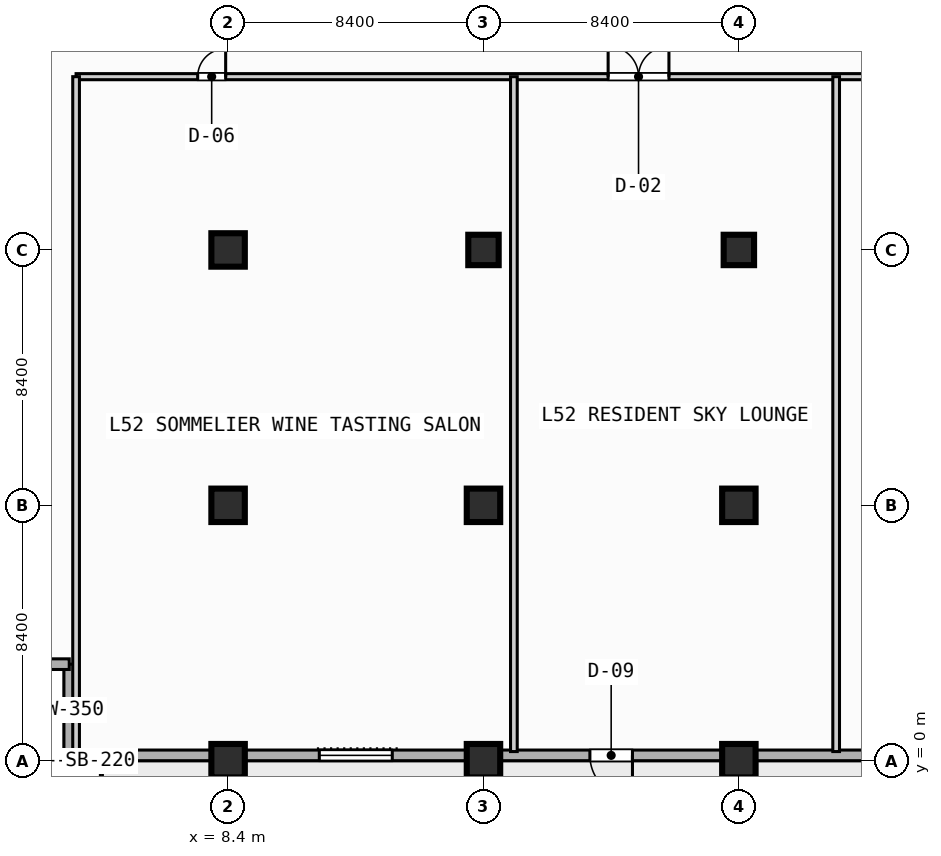
"""IFC4 building model, lengths in metres.
Left out: names, types, materials, properties, quantities, classifications, styles, units other than length and angle.
Written with IfcOpenShell. Run it as: python <this file> out.ifc"""

import sys

from ifc_helpers import new_model, si_unit, direction, frame, frame_2d, origin, origin_2d, place, context, subcontext, project, spatial, rectangle, extrude, element, fill, save


model = new_model("IFC4")
c1 = context("Model", 3, precision=1e-05, world=origin(), true_north=direction((0.0, 1.0)))
c2 = subcontext(c1, "Body", "Model", "MODEL_VIEW")
j1 = project(units=[si_unit("LENGTHUNIT", "METRE"), si_unit("PLANEANGLEUNIT", "RADIAN")], contexts=[c1])
p1 = place(None, origin())
s1 = spatial("IfcSite", under=j1, at=p1, CompositionType="ELEMENT")
p2 = place(p1, origin())
s2 = spatial("IfcBuilding", under=s1, at=p2, CompositionType="ELEMENT")
p3 = place(p2, frame((0.0, 0.0, 212.4)))
s3 = spatial("IfcBuildingStorey", under=s2, at=p3, CompositionType="ELEMENT", Elevation=212.4)
for number, where, z_axis, x_axis in (
    (1, (8.4, 0.0, 0.0), (0.0, 0.0, 1.0), (1.0, 0.0, 0.0)),
    (2, (8.4, 8.4, 0.0), (0.0, 0.0, 1.0), (1.0, 0.0, 0.0)),
    (3, (8.4, 16.8, 0.0), (0.0, 0.0, 1.0), (1.0, 0.0, 0.0)),
    (4, (16.8, 0.0, 0.0), (0.0, 0.0, 1.0), (1.0, 0.0, 0.0)),
    (5, (16.8, 8.4, 0.0), (0.0, 0.0, 1.0), (1.0, 0.0, 0.0)),
):
    element("IfcColumn", number, at=place(p3, frame(where, z_axis=z_axis, x_axis=x_axis)), inside=s3, PredefinedType="COLUMN", context=c2, shape_type="SweptSolid", body=[
        extrude(rectangle(XDim=1.1, YDim=1.1, at=origin_2d()), origin(), (0.0, 0.0, 1.0), 3.7),
    ])
p4 = place(p3, frame((16.8, 16.8, 0.0), z_axis=(0.0, 0.0, 1.0), x_axis=(1.0, 0.0, 0.0)))
e6 = element("IfcColumn", 6, at=p4, inside=s3, PredefinedType="COLUMN", context=c2, shape_type="SweptSolid", body=[
    extrude(rectangle(XDim=1.0, YDim=1.0, at=origin_2d()), origin(), (0.0, 0.0, 1.0), 3.7),
])
for number, where, z_axis, x_axis in (
    (7, (25.2, 0.0, 0.0), (0.0, 0.0, 1.0), (1.0, 0.0, 0.0)),
    (8, (25.2, 8.4, 0.0), (0.0, 0.0, 1.0), (1.0, 0.0, 0.0)),
):
    element("IfcColumn", number, at=place(p3, frame(where, z_axis=z_axis, x_axis=x_axis)), inside=s3, PredefinedType="COLUMN", context=c2, shape_type="SweptSolid", body=[
        extrude(rectangle(XDim=1.1, YDim=1.1, at=origin_2d()), origin(), (0.0, 0.0, 1.0), 3.7),
    ])
p5 = place(p3, frame((25.2, 16.8, 0.0), z_axis=(0.0, 0.0, 1.0), x_axis=(1.0, 0.0, 0.0)))
e9 = element("IfcColumn", 9, at=p5, inside=s3, PredefinedType="COLUMN", context=c2, shape_type="SweptSolid", body=[
    extrude(rectangle(XDim=1.0, YDim=1.0, at=origin_2d()), origin(), (0.0, 0.0, 1.0), 3.7),
])
for number, where, z_axis, x_axis in (
    (10, (3.175, 0.175, 0.0), (0.0, 0.0, 1.0), (0.0, 1.0, 0.0)),
    (11, (3.175, 3.175, 0.0), (0.0, 0.0, 1.0), (-1.0, 0.0, 0.0)),
):
    element("IfcWall", number, at=place(p3, frame(where, z_axis=z_axis, x_axis=x_axis)), inside=s3, PredefinedType="STANDARD", context=c2, shape_type="SweptSolid", body=[
        extrude(rectangle(XDim=3.0, YDim=0.35, at=frame_2d((1.5, 0.0))), origin(), (0.0, 0.0, 1.0), 3.47),
    ])
p6 = place(p3, frame((72.425, 0.175, 0.0), z_axis=(0.0, 0.0, 1.0), x_axis=(-1.0, 0.0, 0.0)))
e12 = element("IfcWall", 12, at=p6, inside=s3, PredefinedType="STANDARD", context=c2, shape_type="SweptSolid", body=[
    extrude(rectangle(XDim=69.25, YDim=0.35, at=frame_2d((34.625, 0.0))), origin(), (0.0, 0.0, 1.0), 3.47),
])
p7 = place(p6, frame((50.725, 0.0, 0.0)))
e13 = element("IfcOpeningElement", 13, at=p7, cuts=e12, PredefinedType="OPENING", context=c2, shape_type="SweptSolid", body=[
    extrude(rectangle(XDim=1.4, YDim=2.2, at=frame_2d((0.7, 1.1))), frame((0.0, 0.185, 0.0), z_axis=(0.0, -1.0, 0.0), x_axis=(1.0, 0.0, 0.0)), (0.0, 0.0, 1.0), 0.37),
])
p8 = place(p6, frame((58.625, 0.0, 0.85)))
e14 = element("IfcOpeningElement", 14, at=p8, cuts=e12, PredefinedType="OPENING", context=c2, shape_type="SweptSolid", body=[
    extrude(rectangle(XDim=2.4, YDim=1.95, at=frame_2d((1.2, 0.975))), frame((0.0, 0.185, 0.0), z_axis=(0.0, -1.0, 0.0), x_axis=(1.0, 0.0, 0.0)), (0.0, 0.0, 1.0), 0.37),
])
p9 = place(p6, frame((33.725, 0.0, 0.85)))
e15 = element("IfcOpeningElement", 15, at=p9, cuts=e12, PredefinedType="OPENING", context=c2, shape_type="SweptSolid", body=[
    extrude(rectangle(XDim=1.8, YDim=1.8, at=frame_2d((0.9, 0.9))), frame((0.0, 0.185, 0.0), z_axis=(0.0, -1.0, 0.0), x_axis=(1.0, 0.0, 0.0)), (0.0, 0.0, 1.0), 0.37),
])
p10 = place(p6, frame((25.025, 0.0, 0.85)))
e16 = element("IfcOpeningElement", 16, at=p10, cuts=e12, PredefinedType="OPENING", context=c2, shape_type="SweptSolid", body=[
    extrude(rectangle(XDim=2.4, YDim=1.95, at=frame_2d((1.2, 0.975))), frame((0.0, 0.185, 0.0), z_axis=(0.0, -1.0, 0.0), x_axis=(1.0, 0.0, 0.0)), (0.0, 0.0, 1.0), 0.37),
])
p11 = place(p6, frame((9.075, 0.0, 0.85)))
e17 = element("IfcOpeningElement", 17, at=p11, cuts=e12, PredefinedType="OPENING", context=c2, shape_type="SweptSolid", body=[
    extrude(rectangle(XDim=1.8, YDim=1.8, at=frame_2d((0.9, 0.9))), frame((0.0, 0.185, 0.0), z_axis=(0.0, -1.0, 0.0), x_axis=(1.0, 0.0, 0.0)), (0.0, 0.0, 1.0), 0.37),
])
p12 = place(p6, frame((2.675, 0.0, 0.85)))
e18 = element("IfcOpeningElement", 18, at=p12, cuts=e12, PredefinedType="OPENING", context=c2, shape_type="SweptSolid", body=[
    extrude(rectangle(XDim=1.8, YDim=1.8, at=frame_2d((0.9, 0.9))), frame((0.0, 0.185, 0.0), z_axis=(0.0, -1.0, 0.0), x_axis=(1.0, 0.0, 0.0)), (0.0, 0.0, 1.0), 0.37),
])
p13 = place(p3, frame((3.4, 22.5, 0.0), z_axis=(0.0, 0.0, 1.0), x_axis=(1.0, 0.0, 0.0)))
e19 = element("IfcWall", 19, at=p13, inside=s3, PredefinedType="PARTITIONING", context=c2, shape_type="SweptSolid", body=[
    extrude(rectangle(XDim=35.8, YDim=0.2, at=frame_2d((17.9, 0.0))), origin(), (0.0, 0.0, 1.0), 3.47),
])
p14 = place(p13, frame((4.0, 0.0, 0.0)))
e20 = element("IfcOpeningElement", 20, at=p14, cuts=e19, PredefinedType="OPENING", context=c2, shape_type="SweptSolid", body=[
    extrude(rectangle(XDim=0.92, YDim=2.1, at=frame_2d((0.46, 1.05))), frame((0.0, 0.11, 0.0), z_axis=(0.0, -1.0, 0.0), x_axis=(1.0, 0.0, 0.0)), (0.0, 0.0, 1.0), 0.22),
])
p15 = place(p13, frame((17.5, 0.0, 0.0)))
e21 = element("IfcOpeningElement", 21, at=p15, cuts=e19, PredefinedType="OPENING", context=c2, shape_type="SweptSolid", body=[
    extrude(rectangle(XDim=2.0, YDim=2.15, at=frame_2d((1.0, 1.075))), frame((0.0, 0.11, 0.0), z_axis=(0.0, -1.0, 0.0), x_axis=(1.0, 0.0, 0.0)), (0.0, 0.0, 1.0), 0.22),
])
p16 = place(p13, frame((27.5, 0.0, 0.0)))
e22 = element("IfcOpeningElement", 22, at=p16, cuts=e19, PredefinedType="OPENING", context=c2, shape_type="SweptSolid", body=[
    extrude(rectangle(XDim=2.0, YDim=2.15, at=frame_2d((1.0, 1.075))), frame((0.0, 0.11, 0.0), z_axis=(0.0, -1.0, 0.0), x_axis=(1.0, 0.0, 0.0)), (0.0, 0.0, 1.0), 0.22),
])
for number, where, z_axis, x_axis in (
    (23, (3.4, 0.3, 0.0), (0.0, 0.0, 1.0), (0.0, 1.0, 0.0)),
    (24, (17.8, 0.3, 0.0), (0.0, 0.0, 1.0), (0.0, 1.0, 0.0)),
    (25, (28.4, 0.3, 0.0), (0.0, 0.0, 1.0), (0.0, 1.0, 0.0)),
):
    element("IfcWall", number, at=place(p3, frame(where, z_axis=z_axis, x_axis=x_axis)), inside=s3, PredefinedType="PARTITIONING", context=c2, shape_type="SweptSolid", body=[
        extrude(rectangle(XDim=22.2, YDim=0.22, at=frame_2d((11.1, 0.0))), origin(), (0.0, 0.0, 1.0), 3.47),
    ])
p17 = place(p7, origin())
e26 = element("IfcDoor", 26, at=p17, inside=s3, OperationType="SINGLE_SWING_LEFT", PredefinedType="DOOR", context=c2, shape_type="SweptSolid", body=[
    extrude(rectangle(XDim=1.4, YDim=2.2, at=frame_2d((0.7, 1.1))), frame((0.0, 0.025, 0.0), z_axis=(0.0, -1.0, 0.0), x_axis=(1.0, 0.0, 0.0)), (0.0, 0.0, 1.0), 0.05),
])
fill(e13, e26)
p18 = place(p8, origin())
e27 = element("IfcWindow", 27, at=p18, inside=s3, PartitioningType="SINGLE_PANEL", PredefinedType="WINDOW", context=c2, shape_type="SweptSolid", body=[
    extrude(rectangle(XDim=2.4, YDim=1.95, at=frame_2d((1.2, 0.975))), frame((0.0, 0.03, 0.0), z_axis=(0.0, -1.0, 0.0), x_axis=(1.0, 0.0, 0.0)), (0.0, 0.0, 1.0), 0.06),
])
fill(e14, e27)
p19 = place(p14, origin())
e28 = element("IfcDoor", 28, at=p19, inside=s3, OperationType="SINGLE_SWING_RIGHT", PredefinedType="DOOR", context=c2, shape_type="SweptSolid", body=[
    extrude(rectangle(XDim=0.92, YDim=2.1, at=frame_2d((0.46, 1.05))), frame((0.0, 0.025, 0.0), z_axis=(0.0, -1.0, 0.0), x_axis=(1.0, 0.0, 0.0)), (0.0, 0.0, 1.0), 0.05),
])
fill(e20, e28)
p20 = place(p15, origin())
e29 = element("IfcDoor", 29, at=p20, inside=s3, OperationType="SINGLE_SWING_LEFT", PredefinedType="DOOR", context=c2, shape_type="SweptSolid", body=[
    extrude(rectangle(XDim=2.0, YDim=2.15, at=frame_2d((1.0, 1.075))), frame((0.0, 0.025, 0.0), z_axis=(0.0, -1.0, 0.0), x_axis=(1.0, 0.0, 0.0)), (0.0, 0.0, 1.0), 0.05),
])
fill(e21, e29)
save(model, sys.argv[1])
